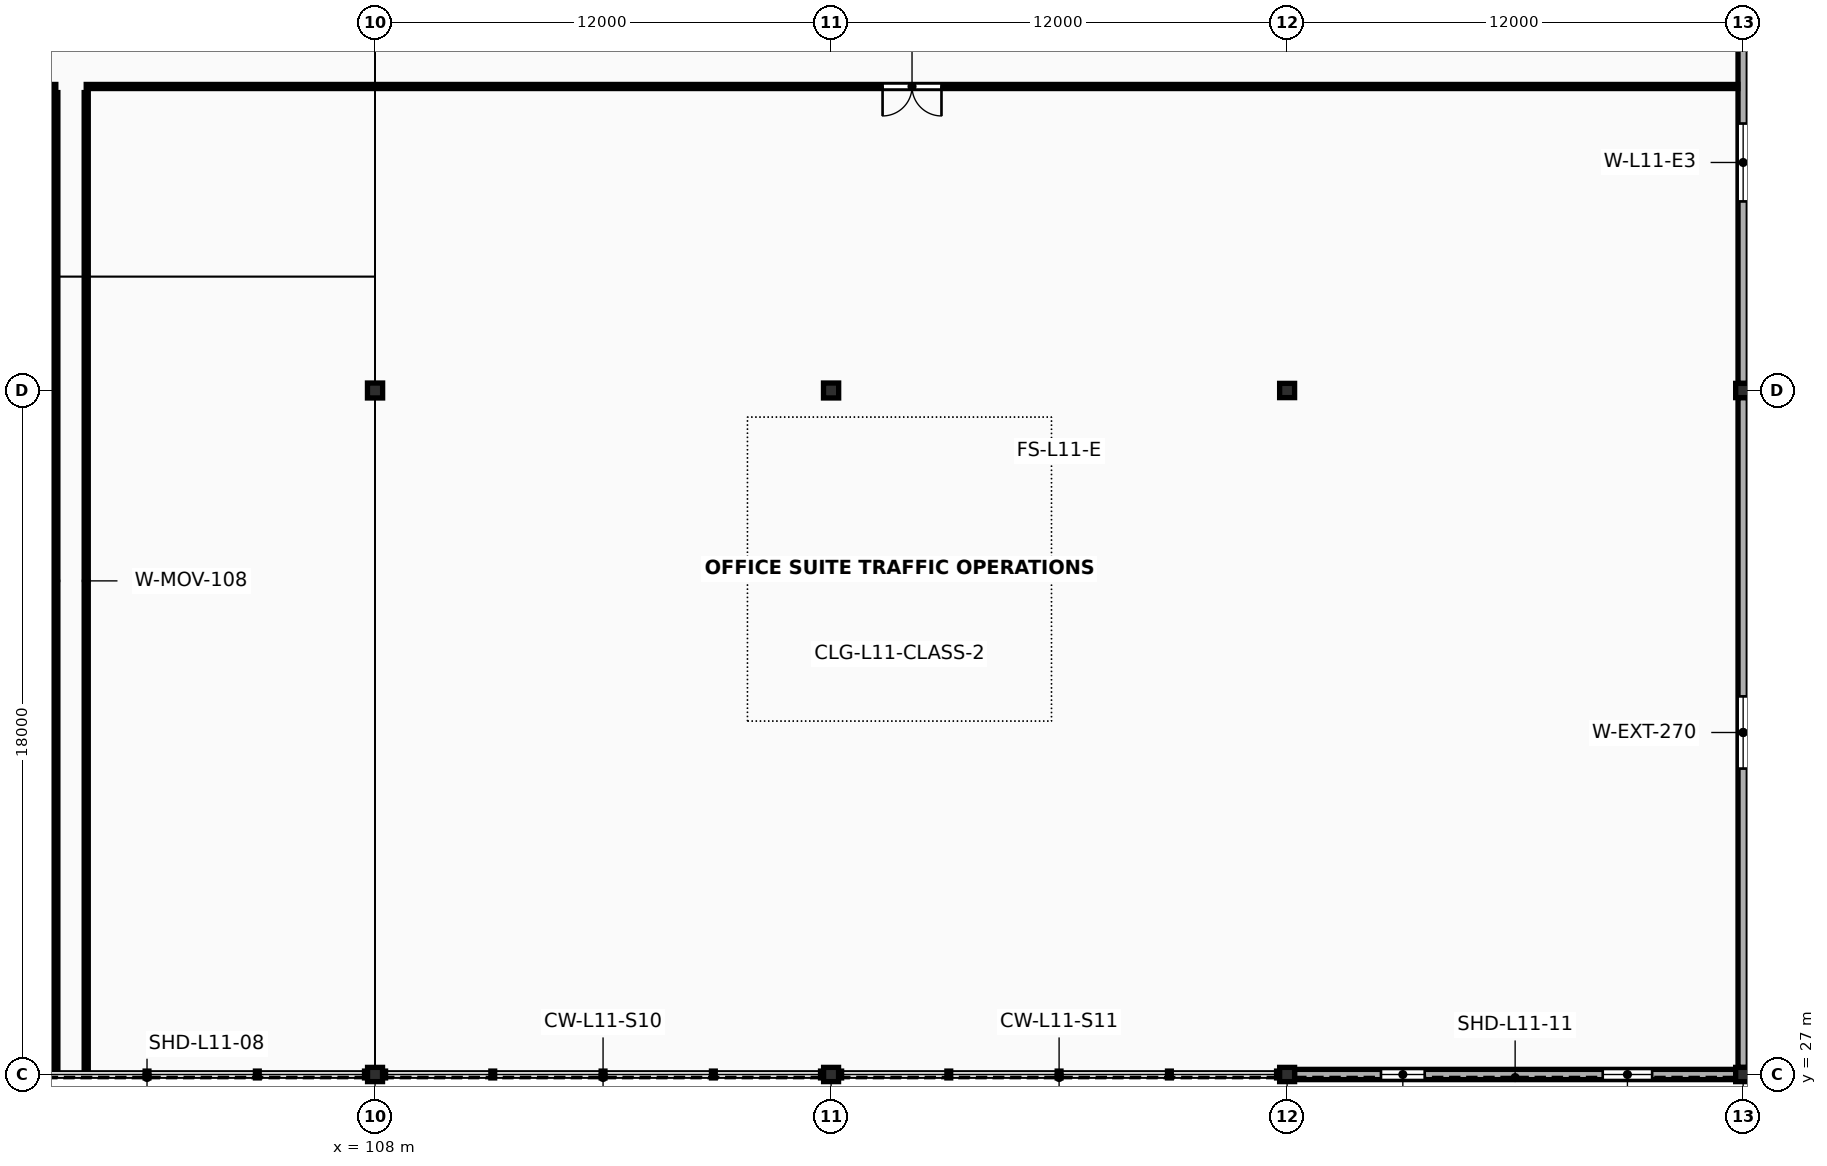
"""IFC4 building model, lengths in metres.
Left out: names, types, materials, properties, quantities, classifications, styles, units other than length and angle.
Written with IfcOpenShell. Run it as: python <this file> out.ifc"""

import sys

from ifc_helpers import new_model, si_unit, direction, frame, frame_2d, origin, origin_2d, place, context, subcontext, project, spatial, rectangle, i_section, extrude, element, fill, save


model = new_model("IFC4")
c1 = context("Model", 3, precision=1e-05, world=origin(), true_north=direction((0.0, 1.0)))
c2 = subcontext(c1, "Body", "Model", "MODEL_VIEW")
j1 = project(units=[si_unit("LENGTHUNIT", "METRE"), si_unit("PLANEANGLEUNIT", "RADIAN")], contexts=[c1])
p1 = place(None, origin())
s1 = spatial("IfcSite", under=j1, at=p1, CompositionType="ELEMENT")
p2 = place(p1, origin())
s2 = spatial("IfcBuilding", under=s1, at=p2, CompositionType="ELEMENT")
p3 = place(p2, frame((0.0, 0.0, 45.6)))
s3 = spatial("IfcBuildingStorey", under=s2, at=p3, CompositionType="ELEMENT", Elevation=45.6)
p4 = place(p3, frame((108.0, 27.0, 0.0), z_axis=(0.0, 0.0, 1.0), x_axis=(1.0, 0.0, 0.0)))
e1 = element("IfcColumn", 1, at=p4, inside=s3, PredefinedType="COLUMN", context=c2, shape_type="SweptSolid", body=[
    extrude(i_section(OverallWidth=0.394, OverallDepth=0.375, WebThickness=0.017, FlangeThickness=0.028, FilletRadius=0.018, at=origin_2d()), origin(), (0.0, 0.0, 1.0), 4.0),
])
p5 = place(p3, frame((108.0, 45.0, 0.0), z_axis=(0.0, 0.0, 1.0), x_axis=(1.0, 0.0, 0.0)))
e2 = element("IfcColumn", 2, at=p5, inside=s3, PredefinedType="COLUMN", context=c2, shape_type="SweptSolid", body=[
    extrude(i_section(OverallWidth=0.399, OverallDepth=0.393, WebThickness=0.023, FlangeThickness=0.037, FilletRadius=0.018, at=origin_2d()), origin(), (0.0, 0.0, 1.0), 4.0),
])
p6 = place(p3, frame((120.0, 27.0, 0.0), z_axis=(0.0, 0.0, 1.0), x_axis=(1.0, 0.0, 0.0)))
e3 = element("IfcColumn", 3, at=p6, inside=s3, PredefinedType="COLUMN", context=c2, shape_type="SweptSolid", body=[
    extrude(i_section(OverallWidth=0.394, OverallDepth=0.375, WebThickness=0.017, FlangeThickness=0.028, FilletRadius=0.018, at=origin_2d()), origin(), (0.0, 0.0, 1.0), 4.0),
])
p7 = place(p3, frame((120.0, 45.0, 0.0), z_axis=(0.0, 0.0, 1.0), x_axis=(1.0, 0.0, 0.0)))
e4 = element("IfcColumn", 4, at=p7, inside=s3, PredefinedType="COLUMN", context=c2, shape_type="SweptSolid", body=[
    extrude(i_section(OverallWidth=0.399, OverallDepth=0.393, WebThickness=0.023, FlangeThickness=0.037, FilletRadius=0.018, at=origin_2d()), origin(), (0.0, 0.0, 1.0), 4.0),
])
for number, where, z_axis, x_axis in (
    (5, (132.0, 27.0, 0.0), (0.0, 0.0, 1.0), (1.0, 0.0, 0.0)),
    (6, (132.0, 45.0, 0.0), (0.0, 0.0, 1.0), (1.0, 0.0, 0.0)),
    (7, (144.0, 27.0, 0.0), (0.0, 0.0, 1.0), (1.0, 0.0, 0.0)),
    (8, (144.0, 45.0, 0.0), (0.0, 0.0, 1.0), (1.0, 0.0, 0.0)),
):
    element("IfcColumn", number, at=place(p3, frame(where, z_axis=z_axis, x_axis=x_axis)), inside=s3, PredefinedType="COLUMN", context=c2, shape_type="SweptSolid", body=[
        extrude(i_section(OverallWidth=0.394, OverallDepth=0.375, WebThickness=0.017, FlangeThickness=0.028, FilletRadius=0.018, at=origin_2d()), origin(), (0.0, 0.0, 1.0), 4.0),
    ])
p8 = place(p3, frame((132.195, 27.0, 0.0), z_axis=(0.0, 0.0, 1.0), x_axis=(1.0, 0.0, 0.0)))
e9 = element("IfcWall", 9, at=p8, inside=s3, PredefinedType="SOLIDWALL", context=c2, shape_type="SweptSolid", body=[
    extrude(rectangle(XDim=11.61, YDim=0.27, at=frame_2d((5.805, 0.0))), origin(), (0.0, 0.0, 1.0), 3.236),
])
p9 = place(p8, frame((2.275, 0.0, 0.78)))
e10 = element("IfcOpeningElement", 10, at=p9, cuts=e9, PredefinedType="OPENING", context=c2, shape_type="SweptSolid", body=[
    extrude(rectangle(XDim=1.15, YDim=1.25, at=frame_2d((0.575, 0.625))), frame((0.0, 0.15, 0.0), z_axis=(0.0, -1.0, 0.0), x_axis=(1.0, 0.0, 0.0)), (0.0, 0.0, 1.0), 0.3),
])
p10 = place(p8, frame((8.11, 0.0, 0.78)))
e11 = element("IfcOpeningElement", 11, at=p10, cuts=e9, PredefinedType="OPENING", context=c2, shape_type="SweptSolid", body=[
    extrude(rectangle(XDim=1.3, YDim=1.25, at=frame_2d((0.65, 0.625))), frame((0.0, 0.15, 0.0), z_axis=(0.0, -1.0, 0.0), x_axis=(1.0, 0.0, 0.0)), (0.0, 0.0, 1.0), 0.3),
])
p11 = place(p3, frame((144.0, 27.186, 0.0), z_axis=(0.0, 0.0, 1.0), x_axis=(0.0, 1.0, 0.0)))
e12 = element("IfcWall", 12, at=p11, inside=s3, PredefinedType="SOLIDWALL", context=c2, shape_type="SweptSolid", body=[
    extrude(rectangle(XDim=17.629, YDim=0.27, at=frame_2d((8.814, 0.0))), origin(), (0.0, 0.0, 1.0), 3.236),
])
p12 = place(p11, frame((7.865, 0.0, 0.78)))
e13 = element("IfcOpeningElement", 13, at=p12, cuts=e12, PredefinedType="OPENING", context=c2, shape_type="SweptSolid", body=[
    extrude(rectangle(XDim=1.9, YDim=1.25, at=frame_2d((0.95, 0.625))), frame((0.0, 0.15, 0.0), z_axis=(0.0, -1.0, 0.0), x_axis=(1.0, 0.0, 0.0)), (0.0, 0.0, 1.0), 0.3),
])
p13 = place(p3, frame((144.0, 45.186, 0.0), z_axis=(0.0, 0.0, 1.0), x_axis=(0.0, 1.0, 0.0)))
e14 = element("IfcWall", 14, at=p13, inside=s3, PredefinedType="SOLIDWALL", context=c2, shape_type="SweptSolid", body=[
    extrude(rectangle(XDim=11.629, YDim=0.27, at=frame_2d((5.814, 0.0))), origin(), (0.0, 0.0, 1.0), 3.236),
])
p14 = place(p13, frame((4.79, 0.0, 0.78)))
e15 = element("IfcOpeningElement", 15, at=p14, cuts=e14, PredefinedType="OPENING", context=c2, shape_type="SweptSolid", body=[
    extrude(rectangle(XDim=2.05, YDim=1.25, at=frame_2d((1.025, 0.625))), frame((0.0, 0.15, 0.0), z_axis=(0.0, -1.0, 0.0), x_axis=(1.0, 0.0, 0.0)), (0.0, 0.0, 1.0), 0.3),
])
p15 = place(p3, frame((84.6, 53.0, 0.0), z_axis=(0.0, 0.0, 1.0), x_axis=(1.0, 0.0, 0.0)))
e16 = element("IfcWall", 16, at=p15, inside=s3, PredefinedType="MOVABLE", context=c2, shape_type="SweptSolid", body=[
    extrude(rectangle(XDim=15.0, YDim=0.108, at=frame_2d((7.5, 0.0))), origin(), (0.0, 0.0, 1.0), 2.88),
])
p16 = place(p15, frame((6.755, 0.0, 0.0)))
e17 = element("IfcOpeningElement", 17, at=p16, cuts=e16, PredefinedType="OPENING", context=c2, shape_type="SweptSolid", body=[
    extrude(rectangle(XDim=1.49, YDim=2.28, at=frame_2d((0.745, 1.14))), frame((0.0, 0.069, 0.0), z_axis=(0.0, -1.0, 0.0), x_axis=(1.0, 0.0, 0.0)), (0.0, 0.0, 1.0), 0.138),
])
p17 = place(p3, frame((99.6, 27.14, 0.0), z_axis=(0.0, 0.0, 1.0), x_axis=(0.0, 1.0, 0.0)))
e18 = element("IfcWall", 18, at=p17, inside=s3, PredefinedType="MOVABLE", context=c2, shape_type="SweptSolid", body=[
    extrude(rectangle(XDim=25.7, YDim=0.108, at=frame_2d((12.85, 0.0))), origin(), (0.0, 0.0, 1.0), 2.88),
])
p18 = place(p3, frame((100.4, 53.0, 0.0), z_axis=(0.0, 0.0, 1.0), x_axis=(1.0, 0.0, 0.0)))
e19 = element("IfcWall", 19, at=p18, inside=s3, PredefinedType="MOVABLE", context=c2, shape_type="SweptSolid", body=[
    extrude(rectangle(XDim=43.46, YDim=0.108, at=frame_2d((21.73, 0.0))), origin(), (0.0, 0.0, 1.0), 2.88),
])
p19 = place(p18, frame((20.955, 0.0, 0.0)))
e20 = element("IfcOpeningElement", 20, at=p19, cuts=e19, PredefinedType="OPENING", context=c2, shape_type="SweptSolid", body=[
    extrude(rectangle(XDim=1.55, YDim=2.31, at=frame_2d((0.775, 1.155))), frame((0.0, 0.069, 0.0), z_axis=(0.0, -1.0, 0.0), x_axis=(1.0, 0.0, 0.0)), (0.0, 0.0, 1.0), 0.138),
])
p20 = place(p3, frame((100.4, 27.14, 0.0), z_axis=(0.0, 0.0, 1.0), x_axis=(0.0, 1.0, 0.0)))
e21 = element("IfcWall", 21, at=p20, inside=s3, PredefinedType="MOVABLE", context=c2, shape_type="SweptSolid", body=[
    extrude(rectangle(XDim=25.7, YDim=0.108, at=frame_2d((12.85, 0.0))), origin(), (0.0, 0.0, 1.0), 2.88),
])
p21 = place(p9, origin())
e22 = element("IfcWindow", 22, at=p21, inside=s3, PartitioningType="SINGLE_PANEL", PredefinedType="WINDOW", context=c2, shape_type="SweptSolid", body=[
    extrude(rectangle(XDim=1.15, YDim=1.25, at=frame_2d((0.575, 0.625))), frame((0.0, 0.03, 0.0), z_axis=(0.0, -1.0, 0.0), x_axis=(1.0, 0.0, 0.0)), (0.0, 0.0, 1.0), 0.06),
])
fill(e10, e22)
p22 = place(p10, origin())
e23 = element("IfcWindow", 23, at=p22, inside=s3, PartitioningType="SINGLE_PANEL", PredefinedType="WINDOW", context=c2, shape_type="SweptSolid", body=[
    extrude(rectangle(XDim=1.3, YDim=1.25, at=frame_2d((0.65, 0.625))), frame((0.0, 0.03, 0.0), z_axis=(0.0, -1.0, 0.0), x_axis=(1.0, 0.0, 0.0)), (0.0, 0.0, 1.0), 0.06),
])
fill(e11, e23)
p23 = place(p12, origin())
e24 = element("IfcWindow", 24, at=p23, inside=s3, PartitioningType="DOUBLE_PANEL_VERTICAL", PredefinedType="WINDOW", context=c2, shape_type="SweptSolid", body=[
    extrude(rectangle(XDim=1.9, YDim=1.25, at=frame_2d((0.95, 0.625))), frame((0.0, 0.03, 0.0), z_axis=(0.0, -1.0, 0.0), x_axis=(1.0, 0.0, 0.0)), (0.0, 0.0, 1.0), 0.06),
])
fill(e13, e24)
p24 = place(p14, origin())
e25 = element("IfcWindow", 25, at=p24, inside=s3, PartitioningType="DOUBLE_PANEL_VERTICAL", PredefinedType="WINDOW", context=c2, shape_type="SweptSolid", body=[
    extrude(rectangle(XDim=2.05, YDim=1.25, at=frame_2d((1.025, 0.625))), frame((0.0, 0.03, 0.0), z_axis=(0.0, -1.0, 0.0), x_axis=(1.0, 0.0, 0.0)), (0.0, 0.0, 1.0), 0.06),
])
fill(e15, e25)
p25 = place(p19, origin())
e26 = element("IfcDoor", 26, at=p25, inside=s3, OperationType="DOUBLE_DOOR_SINGLE_SWING", PredefinedType="DOOR", context=c2, shape_type="SweptSolid", body=[
    extrude(rectangle(XDim=1.55, YDim=2.31, at=frame_2d((0.775, 1.155))), frame((0.0, 0.025, 0.0), z_axis=(0.0, -1.0, 0.0), x_axis=(1.0, 0.0, 0.0)), (0.0, 0.0, 1.0), 0.05),
])
fill(e20, e26)
save(model, sys.argv[1])
